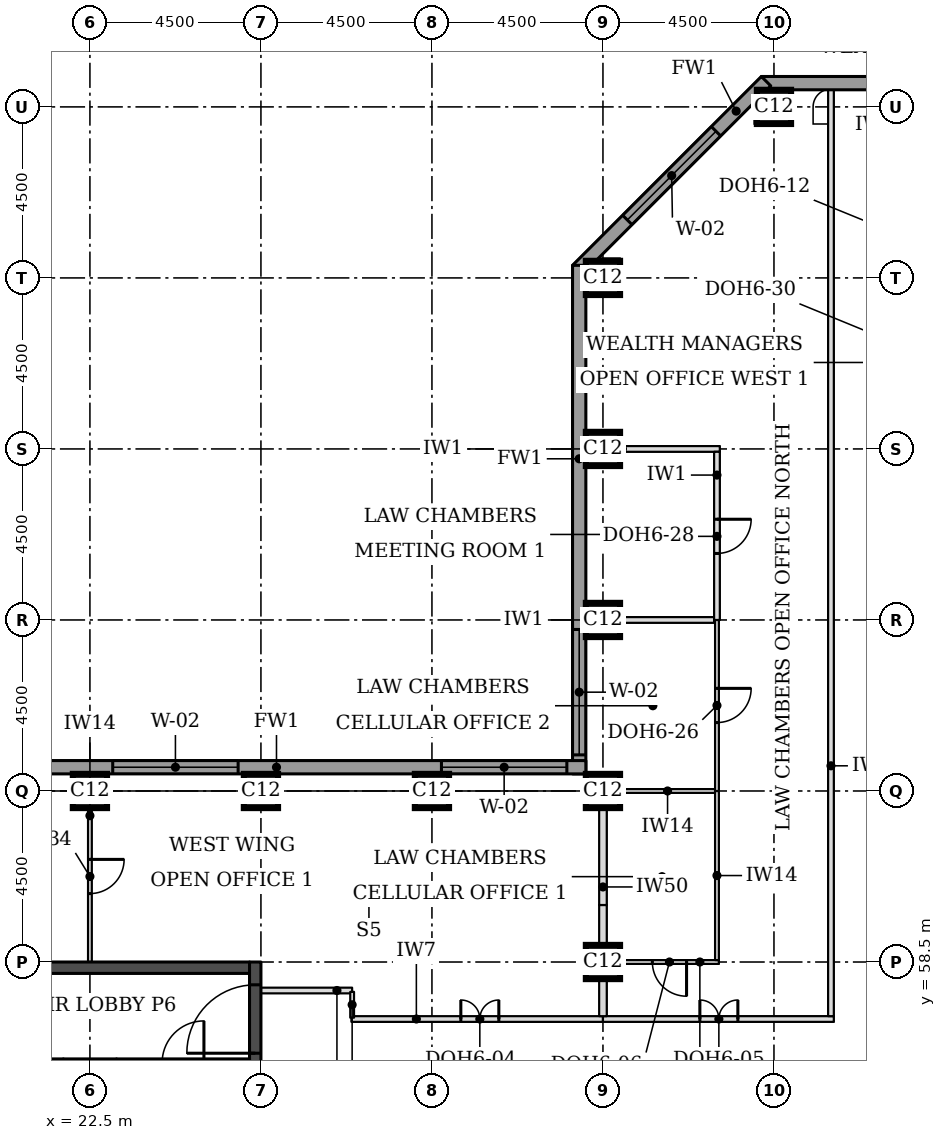
"""IFC4 building model, lengths in metres.
Left out: names, types, materials, properties, quantities, classifications, styles, units other than length and angle.
Written with IfcOpenShell. Run it as: python <this file> out.ifc"""

import sys

from ifc_helpers import new_model, si_unit, direction, frame, frame_2d, origin, origin_2d, place, context, subcontext, project, spatial, rectangle, extrude, element, fill, save


model = new_model("IFC4")
c1 = context("Model", 3, precision=1e-05, world=origin(), true_north=direction((0.0, 1.0)))
c2 = subcontext(c1, "Body", "Model", "MODEL_VIEW")
j1 = project(units=[si_unit("LENGTHUNIT", "METRE"), si_unit("PLANEANGLEUNIT", "RADIAN")], contexts=[c1])
p1 = place(None, origin())
s1 = spatial("IfcSite", under=j1, at=p1, CompositionType="ELEMENT")
p2 = place(p1, origin())
s2 = spatial("IfcBuilding", under=s1, at=p2, CompositionType="ELEMENT")
p3 = place(p2, frame((0.0, 0.0, 188.4)))
s3 = spatial("IfcBuildingStorey", under=s2, at=p3, CompositionType="ELEMENT", Elevation=188.4)
for number, where, z_axis, x_axis in (
    (1, (36.0, 58.5, 0.0), (0.0, 0.0, 1.0), (1.0, 0.0, 0.0)),
    (2, (22.5, 63.0, 0.0), (0.0, 0.0, 1.0), (1.0, 0.0, 0.0)),
    (3, (27.0, 63.0, 0.0), (0.0, 0.0, 1.0), (1.0, 0.0, 0.0)),
    (4, (31.5, 63.0, 0.0), (0.0, 0.0, 1.0), (1.0, 0.0, 0.0)),
    (5, (36.0, 63.0, 0.0), (0.0, 0.0, 1.0), (1.0, 0.0, 0.0)),
    (6, (36.0, 67.5, 0.0), (0.0, 0.0, 1.0), (1.0, 0.0, 0.0)),
    (7, (36.0, 72.0, 0.0), (0.0, 0.0, 1.0), (1.0, 0.0, 0.0)),
    (8, (36.0, 76.5, 0.0), (0.0, 0.0, 1.0), (1.0, 0.0, 0.0)),
    (9, (40.5, 81.0, 0.0), (0.0, 0.0, 1.0), (1.0, 0.0, 0.0)),
):
    element("IfcColumn", number, at=place(p3, frame(where, z_axis=z_axis, x_axis=x_axis)), inside=s3, PredefinedType="COLUMN", context=c2, shape_type="SweptSolid", body=[
        extrude(rectangle(XDim=0.9, YDim=0.9, at=origin_2d()), origin(), (0.0, 0.0, 1.0), 3.7),
    ])
p4 = place(p3, frame((18.3, 58.35, 0.0), z_axis=(0.0, 0.0, 1.0), x_axis=(1.0, 0.0, 0.0)))
e10 = element("IfcWall", 10, at=p4, inside=s3, PredefinedType="SHEAR", context=c2, shape_type="SweptSolid", body=[
    extrude(rectangle(XDim=8.4, YDim=0.3, at=frame_2d((4.2, 0.0))), origin(), (0.0, 0.0, 1.0), 3.7),
])
p5 = place(p3, frame((26.85, 49.5, 0.0), z_axis=(0.0, 0.0, 1.0), x_axis=(0.0, 1.0, 0.0)))
e11 = element("IfcWall", 11, at=p5, inside=s3, PredefinedType="SHEAR", context=c2, shape_type="SweptSolid", body=[
    extrude(rectangle(XDim=9.0, YDim=0.3, at=frame_2d((4.5, 0.0))), origin(), (0.0, 0.0, 1.0), 3.7),
])
p6 = place(p5, frame((6.6, 0.0, 0.0)))
e12 = element("IfcOpeningElement", 12, at=p6, cuts=e11, PredefinedType="OPENING", context=c2, shape_type="SweptSolid", body=[
    extrude(rectangle(XDim=1.8, YDim=2.1, at=frame_2d((0.9, 1.05))), frame((0.0, 0.16, 0.0), z_axis=(0.0, -1.0, 0.0), x_axis=(1.0, 0.0, 0.0)), (0.0, 0.0, 1.0), 0.32),
])
p7 = place(p3, frame((72.331, 81.625, 0.0), z_axis=(0.0, 0.0, 1.0), x_axis=(-1.0, 0.0, 0.0)))
e13 = element("IfcWall", 13, at=p7, inside=s3, PredefinedType="STANDARD", context=c2, shape_type="SweptSolid", body=[
    extrude(rectangle(XDim=32.163, YDim=0.35, at=frame_2d((16.081, 0.0))), origin(), (0.0, 0.0, 1.0), 3.525),
])
p8 = place(p7, frame((5.431, 0.0, 0.9)))
e14 = element("IfcOpeningElement", 14, at=p8, cuts=e13, PredefinedType="OPENING", context=c2, shape_type="SweptSolid", body=[
    extrude(rectangle(XDim=3.3, YDim=1.9, at=frame_2d((1.65, 0.95))), frame((0.0, 0.185, 0.0), z_axis=(0.0, -1.0, 0.0), x_axis=(1.0, 0.0, 0.0)), (0.0, 0.0, 1.0), 0.37),
])
p9 = place(p7, frame((9.931, 0.0, 0.9)))
e15 = element("IfcOpeningElement", 15, at=p9, cuts=e13, PredefinedType="OPENING", context=c2, shape_type="SweptSolid", body=[
    extrude(rectangle(XDim=3.3, YDim=1.9, at=frame_2d((1.65, 0.95))), frame((0.0, 0.185, 0.0), z_axis=(0.0, -1.0, 0.0), x_axis=(1.0, 0.0, 0.0)), (0.0, 0.0, 1.0), 0.37),
])
p10 = place(p7, frame((14.431, 0.0, 0.9)))
e16 = element("IfcOpeningElement", 16, at=p10, cuts=e13, PredefinedType="OPENING", context=c2, shape_type="SweptSolid", body=[
    extrude(rectangle(XDim=3.3, YDim=1.9, at=frame_2d((1.65, 0.95))), frame((0.0, 0.185, 0.0), z_axis=(0.0, -1.0, 0.0), x_axis=(1.0, 0.0, 0.0)), (0.0, 0.0, 1.0), 0.37),
])
p11 = place(p7, frame((18.931, 0.0, 0.9)))
e17 = element("IfcOpeningElement", 17, at=p11, cuts=e13, PredefinedType="OPENING", context=c2, shape_type="SweptSolid", body=[
    extrude(rectangle(XDim=3.3, YDim=1.9, at=frame_2d((1.65, 0.95))), frame((0.0, 0.185, 0.0), z_axis=(0.0, -1.0, 0.0), x_axis=(1.0, 0.0, 0.0)), (0.0, 0.0, 1.0), 0.37),
])
p12 = place(p7, frame((23.431, 0.0, 0.9)))
e18 = element("IfcOpeningElement", 18, at=p12, cuts=e13, PredefinedType="OPENING", context=c2, shape_type="SweptSolid", body=[
    extrude(rectangle(XDim=3.3, YDim=1.9, at=frame_2d((1.65, 0.95))), frame((0.0, 0.185, 0.0), z_axis=(0.0, -1.0, 0.0), x_axis=(1.0, 0.0, 0.0)), (0.0, 0.0, 1.0), 0.37),
])
p13 = place(p3, frame((40.292, 81.676, 0.0), z_axis=(0.0, 0.0, 1.0), x_axis=(-0.707106781187, -0.707106781187, 0.0)))
e19 = element("IfcWall", 19, at=p13, inside=s3, PredefinedType="STANDARD", context=c2, shape_type="SweptSolid", body=[
    extrude(rectangle(XDim=7.027, YDim=0.35, at=frame_2d((3.513, 0.0))), origin(), (0.0, 0.0, 1.0), 3.525),
])
p14 = place(p13, frame((1.863, 0.0, 0.9)))
e20 = element("IfcOpeningElement", 20, at=p14, cuts=e19, PredefinedType="OPENING", context=c2, shape_type="SweptSolid", body=[
    extrude(rectangle(XDim=3.3, YDim=1.9, at=frame_2d((1.65, 0.95))), frame((0.0, 0.185, 0.0), z_axis=(0.0, -1.0, 0.0), x_axis=(1.0, 0.0, 0.0)), (0.0, 0.0, 1.0), 0.37),
])
p15 = place(p3, frame((35.375, 76.831, 0.0), z_axis=(0.0, 0.0, 1.0), x_axis=(0.0, -1.0, 0.0)))
e21 = element("IfcWall", 21, at=p15, inside=s3, PredefinedType="STANDARD", context=c2, shape_type="SweptSolid", body=[
    extrude(rectangle(XDim=13.381, YDim=0.35, at=frame_2d((6.691, 0.0))), origin(), (0.0, 0.0, 1.0), 3.525),
])
p16 = place(p15, frame((9.581, 0.0, 0.9)))
e22 = element("IfcOpeningElement", 22, at=p16, cuts=e21, PredefinedType="OPENING", context=c2, shape_type="SweptSolid", body=[
    extrude(rectangle(XDim=3.3, YDim=1.9, at=frame_2d((1.65, 0.95))), frame((0.0, 0.185, 0.0), z_axis=(0.0, -1.0, 0.0), x_axis=(1.0, 0.0, 0.0)), (0.0, 0.0, 1.0), 0.37),
])
p17 = place(p3, frame((35.55, 63.625, 0.0), z_axis=(0.0, 0.0, 1.0), x_axis=(-1.0, 0.0, 0.0)))
e23 = element("IfcWall", 23, at=p17, inside=s3, PredefinedType="STANDARD", context=c2, shape_type="SweptSolid", body=[
    extrude(rectangle(XDim=17.881, YDim=0.35, at=frame_2d((8.941, 0.0))), origin(), (0.0, 0.0, 1.0), 3.525),
])
p18 = place(p17, frame((0.5, 0.0, 0.9)))
e24 = element("IfcOpeningElement", 24, at=p18, cuts=e23, PredefinedType="OPENING", context=c2, shape_type="SweptSolid", body=[
    extrude(rectangle(XDim=3.3, YDim=1.9, at=frame_2d((1.65, 0.95))), frame((0.0, 0.185, 0.0), z_axis=(0.0, -1.0, 0.0), x_axis=(1.0, 0.0, 0.0)), (0.0, 0.0, 1.0), 0.37),
])
p19 = place(p17, frame((9.15, 0.0, 0.9)))
e25 = element("IfcOpeningElement", 25, at=p19, cuts=e23, PredefinedType="OPENING", context=c2, shape_type="SweptSolid", body=[
    extrude(rectangle(XDim=3.3, YDim=1.9, at=frame_2d((1.65, 0.95))), frame((0.0, 0.185, 0.0), z_axis=(0.0, -1.0, 0.0), x_axis=(1.0, 0.0, 0.0)), (0.0, 0.0, 1.0), 0.37),
])
p20 = place(p3, frame((29.38, 57.0, 0.0), z_axis=(0.0, 0.0, 1.0), x_axis=(1.0, 0.0, 0.0)))
e26 = element("IfcWall", 26, at=p20, inside=s3, PredefinedType="PARTITIONING", context=c2, shape_type="SweptSolid", body=[
    extrude(rectangle(XDim=6.62, YDim=0.15, at=frame_2d((3.31, 0.0))), origin(), (0.0, 0.0, 1.0), 3.55),
])
p21 = place(p20, frame((2.88, 0.0, 0.0)))
e27 = element("IfcOpeningElement", 27, at=p21, cuts=e26, PredefinedType="OPENING", context=c2, shape_type="SweptSolid", body=[
    extrude(rectangle(XDim=1.0, YDim=2.1, at=frame_2d((0.5, 1.05))), frame((0.0, 0.085, 0.0), z_axis=(0.0, -1.0, 0.0), x_axis=(1.0, 0.0, 0.0)), (0.0, 0.0, 1.0), 0.17),
])
p22 = place(p3, frame((36.0, 57.0, 0.0), z_axis=(0.0, 0.0, 1.0), x_axis=(1.0, 0.0, 0.0)))
e28 = element("IfcWall", 28, at=p22, inside=s3, PredefinedType="PARTITIONING", context=c2, shape_type="SweptSolid", body=[
    extrude(rectangle(XDim=6.075, YDim=0.15, at=frame_2d((3.038, 0.0))), origin(), (0.0, 0.0, 1.0), 3.55),
])
p23 = place(p22, frame((2.55, 0.0, 0.0)))
e29 = element("IfcOpeningElement", 29, at=p23, cuts=e28, PredefinedType="OPENING", context=c2, shape_type="SweptSolid", body=[
    extrude(rectangle(XDim=1.0, YDim=2.1, at=frame_2d((0.5, 1.05))), frame((0.0, 0.085, 0.0), z_axis=(0.0, -1.0, 0.0), x_axis=(1.0, 0.0, 0.0)), (0.0, 0.0, 1.0), 0.17),
])
p24 = place(p3, frame((36.45, 58.5, 0.0), z_axis=(0.0, 0.0, 1.0), x_axis=(1.0, 0.0, 0.0)))
e30 = element("IfcWall", 30, at=p24, inside=s3, PredefinedType="PARTITIONING", context=c2, shape_type="SweptSolid", body=[
    extrude(rectangle(XDim=2.6, YDim=0.1, at=frame_2d((1.3, 0.0))), origin(), (0.0, 0.0, 1.0), 3.55),
])
p25 = place(p24, frame((0.85, 0.0, 0.0)))
e31 = element("IfcOpeningElement", 31, at=p25, cuts=e30, PredefinedType="OPENING", context=c2, shape_type="SweptSolid", body=[
    extrude(rectangle(XDim=0.9, YDim=2.1, at=frame_2d((0.45, 1.05))), frame((0.0, 0.06, 0.0), z_axis=(0.0, -1.0, 0.0), x_axis=(1.0, 0.0, 0.0)), (0.0, 0.0, 1.0), 0.12),
])
p26 = place(p3, frame((36.45, 63.0, 0.0), z_axis=(0.0, 0.0, 1.0), x_axis=(1.0, 0.0, 0.0)))
e32 = element("IfcWall", 32, at=p26, inside=s3, PredefinedType="PARTITIONING", context=c2, shape_type="SweptSolid", body=[
    extrude(rectangle(XDim=2.5, YDim=0.1, at=frame_2d((1.25, 0.0))), origin(), (0.0, 0.0, 1.0), 3.55),
])
p27 = place(p3, frame((35.55, 67.5, 0.0), z_axis=(0.0, 0.0, 1.0), x_axis=(1.0, 0.0, 0.0)))
e33 = element("IfcWall", 33, at=p27, inside=s3, PredefinedType="PARTITIONING", context=c2, shape_type="SweptSolid", body=[
    extrude(rectangle(XDim=3.375, YDim=0.15, at=frame_2d((1.688, 0.0))), origin(), (0.0, 0.0, 1.0), 3.55),
])
p28 = place(p3, frame((35.55, 72.0, 0.0), z_axis=(0.0, 0.0, 1.0), x_axis=(1.0, 0.0, 0.0)))
e34 = element("IfcWall", 34, at=p28, inside=s3, PredefinedType="PARTITIONING", context=c2, shape_type="SweptSolid", body=[
    extrude(rectangle(XDim=3.525, YDim=0.15, at=frame_2d((1.762, 0.0))), origin(), (0.0, 0.0, 1.0), 3.55),
])
p29 = place(p3, frame((36.0, 57.075, 0.0), z_axis=(0.0, 0.0, 1.0), x_axis=(0.0, 1.0, 0.0)))
e35 = element("IfcWall", 35, at=p29, inside=s3, PredefinedType="PARTITIONING", context=c2, shape_type="SweptSolid", body=[
    extrude(rectangle(XDim=0.975, YDim=0.2, at=frame_2d((0.488, 0.0))), origin(), (0.0, 0.0, 1.0), 2.8),
])
p30 = place(p3, frame((42.0, 57.075, 0.0), z_axis=(0.0, 0.0, 1.0), x_axis=(0.0, 1.0, 0.0)))
e36 = element("IfcWall", 36, at=p30, inside=s3, PredefinedType="PARTITIONING", context=c2, shape_type="SweptSolid", body=[
    extrude(rectangle(XDim=24.375, YDim=0.15, at=frame_2d((12.188, 0.0))), origin(), (0.0, 0.0, 1.0), 3.55),
])
p31 = place(p3, frame((39.0, 58.55, 0.0), z_axis=(0.0, 0.0, 1.0), x_axis=(0.0, 1.0, 0.0)))
e37 = element("IfcWall", 37, at=p31, inside=s3, PredefinedType="PARTITIONING", context=c2, shape_type="SweptSolid", body=[
    extrude(rectangle(XDim=4.45, YDim=0.1, at=frame_2d((2.225, 0.0))), origin(), (0.0, 0.0, 1.0), 3.55),
])
p32 = place(p3, frame((36.0, 58.92, 0.0), z_axis=(0.0, 0.0, 1.0), x_axis=(0.0, 1.0, 0.0)))
e38 = element("IfcWall", 38, at=p32, inside=s3, PredefinedType="PARTITIONING", context=c2, shape_type="SweptSolid", body=[
    extrude(rectangle(XDim=1.08, YDim=0.2, at=frame_2d((0.54, 0.0))), origin(), (0.0, 0.0, 1.0), 2.8),
])
p33 = place(p3, frame((36.0, 60.0, 0.0), z_axis=(0.0, 0.0, 1.0), x_axis=(0.0, 1.0, 0.0)))
e39 = element("IfcWall", 39, at=p33, inside=s3, PredefinedType="PARTITIONING", context=c2, shape_type="SweptSolid", body=[
    extrude(rectangle(XDim=2.55, YDim=0.2, at=frame_2d((1.275, 0.0))), origin(), (0.0, 0.0, 1.0), 2.8),
])
p34 = place(p3, frame((39.0, 63.0, 0.0), z_axis=(0.0, 0.0, 1.0), x_axis=(0.0, 1.0, 0.0)))
e40 = element("IfcWall", 40, at=p34, inside=s3, PredefinedType="PARTITIONING", context=c2, shape_type="SweptSolid", body=[
    extrude(rectangle(XDim=4.5, YDim=0.1, at=frame_2d((2.25, 0.0))), origin(), (0.0, 0.0, 1.0), 3.55),
])
p35 = place(p34, frame((1.8, 0.0, 0.0)))
e41 = element("IfcOpeningElement", 41, at=p35, cuts=e40, PredefinedType="OPENING", context=c2, shape_type="SweptSolid", body=[
    extrude(rectangle(XDim=0.9, YDim=2.1, at=frame_2d((0.45, 1.05))), frame((0.0, 0.06, 0.0), z_axis=(0.0, -1.0, 0.0), x_axis=(1.0, 0.0, 0.0)), (0.0, 0.0, 1.0), 0.12),
])
p36 = place(p3, frame((39.0, 67.5, 0.0), z_axis=(0.0, 0.0, 1.0), x_axis=(0.0, 1.0, 0.0)))
e42 = element("IfcWall", 42, at=p36, inside=s3, PredefinedType="PARTITIONING", context=c2, shape_type="SweptSolid", body=[
    extrude(rectangle(XDim=4.425, YDim=0.15, at=frame_2d((2.212, 0.0))), origin(), (0.0, 0.0, 1.0), 3.55),
])
p37 = place(p36, frame((1.75, 0.0, 0.0)))
e43 = element("IfcOpeningElement", 43, at=p37, cuts=e42, PredefinedType="OPENING", context=c2, shape_type="SweptSolid", body=[
    extrude(rectangle(XDim=0.9, YDim=2.1, at=frame_2d((0.45, 1.05))), frame((0.0, 0.085, 0.0), z_axis=(0.0, -1.0, 0.0), x_axis=(1.0, 0.0, 0.0)), (0.0, 0.0, 1.0), 0.17),
])
p38 = place(p3, frame((22.5, 63.0, 0.0), z_axis=(0.0, 0.0, 1.0), x_axis=(0.0, -1.0, 0.0)))
e44 = element("IfcWall", 44, at=p38, inside=s3, PredefinedType="PARTITIONING", context=c2, shape_type="SweptSolid", body=[
    extrude(rectangle(XDim=4.5, YDim=0.1, at=frame_2d((2.25, 0.0))), origin(), (0.0, 0.0, 1.0), 3.55),
])
p39 = place(p38, frame((1.8, 0.0, 0.0)))
e45 = element("IfcOpeningElement", 45, at=p39, cuts=e44, PredefinedType="OPENING", context=c2, shape_type="SweptSolid", body=[
    extrude(rectangle(XDim=0.9, YDim=2.1, at=frame_2d((0.45, 1.05))), frame((0.0, 0.06, 0.0), z_axis=(0.0, -1.0, 0.0), x_axis=(1.0, 0.0, 0.0)), (0.0, 0.0, 1.0), 0.12),
])
p40 = place(p3, frame((27.0, 57.75, 0.0), z_axis=(0.0, 0.0, 1.0), x_axis=(1.0, 0.0, 0.0)))
e46 = element("IfcWall", 46, at=p40, inside=s3, PredefinedType="PARTITIONING", context=c2, shape_type="SweptSolid", body=[
    extrude(rectangle(XDim=2.4, YDim=0.15, at=frame_2d((1.2, 0.0))), origin(), (0.0, 0.0, 1.0), 3.55),
])
p41 = place(p3, frame((29.4, 57.715, 0.0), z_axis=(0.0, 0.0, 1.0), x_axis=(0.0, -1.0, 0.0)))
e47 = element("IfcWall", 47, at=p41, inside=s3, PredefinedType="PARTITIONING", context=c2, shape_type="SweptSolid", body=[
    extrude(rectangle(XDim=0.68, YDim=0.1, at=frame_2d((0.34, 0.0))), origin(), (0.0, 0.0, 1.0), 3.55),
])
p42 = place(p3, frame((21.8, 55.85, 0.0), z_axis=(0.0, 0.0, 1.0), x_axis=(1.0, 0.0, 0.0)))
e48 = element("IfcWall", 48, at=p42, inside=s3, PredefinedType="SOLIDWALL", context=c2, shape_type="SweptSolid", body=[
    extrude(rectangle(XDim=1.4, YDim=0.2, at=frame_2d((0.7, 0.0))), origin(), (0.0, 0.0, 1.0), 3.55),
])
p43 = place(p3, frame((18.3, 55.85, 0.0), z_axis=(0.0, 0.0, 1.0), x_axis=(1.0, 0.0, 0.0)))
e49 = element("IfcWall", 49, at=p43, inside=s3, PredefinedType="SOLIDWALL", context=c2, shape_type="SweptSolid", body=[
    extrude(rectangle(XDim=3.5, YDim=0.2, at=frame_2d((1.75, 0.0))), origin(), (0.0, 0.0, 1.0), 3.55),
])
p44 = place(p43, frame((1.2, 0.0, 0.0)))
e50 = element("IfcOpeningElement", 50, at=p44, cuts=e49, PredefinedType="OPENING", context=c2, shape_type="SweptSolid", body=[
    extrude(rectangle(XDim=1.1, YDim=2.1, at=frame_2d((0.55, 1.05))), frame((0.0, 0.11, 0.0), z_axis=(0.0, -1.0, 0.0), x_axis=(1.0, 0.0, 0.0)), (0.0, 0.0, 1.0), 0.22),
])
p45 = place(p3, frame((23.2, 55.85, 0.0), z_axis=(0.0, 0.0, 1.0), x_axis=(1.0, 0.0, 0.0)))
e51 = element("IfcWall", 51, at=p45, inside=s3, PredefinedType="SOLIDWALL", context=c2, shape_type="SweptSolid", body=[
    extrude(rectangle(XDim=3.5, YDim=0.2, at=frame_2d((1.75, 0.0))), origin(), (0.0, 0.0, 1.0), 3.55),
])
p46 = place(p45, frame((1.2, 0.0, 0.0)))
e52 = element("IfcOpeningElement", 52, at=p46, cuts=e51, PredefinedType="OPENING", context=c2, shape_type="SweptSolid", body=[
    extrude(rectangle(XDim=1.1, YDim=2.1, at=frame_2d((0.55, 1.05))), frame((0.0, 0.11, 0.0), z_axis=(0.0, -1.0, 0.0), x_axis=(1.0, 0.0, 0.0)), (0.0, 0.0, 1.0), 0.22),
])
p47 = place(p14, origin())
e53 = element("IfcWindow", 53, at=p47, inside=s3, PartitioningType="SINGLE_PANEL", PredefinedType="WINDOW", context=c2, shape_type="SweptSolid", body=[
    extrude(rectangle(XDim=3.3, YDim=1.9, at=frame_2d((1.65, 0.95))), frame((0.0, 0.085, 0.0), z_axis=(0.0, -1.0, 0.0), x_axis=(1.0, 0.0, 0.0)), (0.0, 0.0, 1.0), 0.06),
])
fill(e20, e53)
p48 = place(p16, origin())
e54 = element("IfcWindow", 54, at=p48, inside=s3, PartitioningType="SINGLE_PANEL", PredefinedType="WINDOW", context=c2, shape_type="SweptSolid", body=[
    extrude(rectangle(XDim=3.3, YDim=1.9, at=frame_2d((1.65, 0.95))), frame((0.0, 0.085, 0.0), z_axis=(0.0, -1.0, 0.0), x_axis=(1.0, 0.0, 0.0)), (0.0, 0.0, 1.0), 0.06),
])
fill(e22, e54)
p49 = place(p18, origin())
e55 = element("IfcWindow", 55, at=p49, inside=s3, PartitioningType="SINGLE_PANEL", PredefinedType="WINDOW", context=c2, shape_type="SweptSolid", body=[
    extrude(rectangle(XDim=3.3, YDim=1.9, at=frame_2d((1.65, 0.95))), frame((0.0, 0.085, 0.0), z_axis=(0.0, -1.0, 0.0), x_axis=(1.0, 0.0, 0.0)), (0.0, 0.0, 1.0), 0.06),
])
fill(e24, e55)
p50 = place(p19, origin())
e56 = element("IfcWindow", 56, at=p50, inside=s3, PartitioningType="SINGLE_PANEL", PredefinedType="WINDOW", context=c2, shape_type="SweptSolid", body=[
    extrude(rectangle(XDim=3.3, YDim=1.9, at=frame_2d((1.65, 0.95))), frame((0.0, 0.085, 0.0), z_axis=(0.0, -1.0, 0.0), x_axis=(1.0, 0.0, 0.0)), (0.0, 0.0, 1.0), 0.06),
])
fill(e25, e56)
p51 = place(p23, origin())
e57 = element("IfcDoor", 57, at=p51, inside=s3, OperationType="DOUBLE_DOOR_SINGLE_SWING", PredefinedType="DOOR", context=c2, shape_type="SweptSolid", body=[
    extrude(rectangle(XDim=1.0, YDim=2.1, at=frame_2d((0.5, 1.05))), frame((0.0, 0.025, 0.0), z_axis=(0.0, -1.0, 0.0), x_axis=(1.0, 0.0, 0.0)), (0.0, 0.0, 1.0), 0.05),
])
fill(e29, e57)
p52 = place(p25, frame((0.9, 0.0, 0.0), z_axis=(0.0, 0.0, 1.0), x_axis=(-1.0, 0.0, 0.0)))
e58 = element("IfcDoor", 58, at=p52, inside=s3, OperationType="SINGLE_SWING_LEFT", PredefinedType="DOOR", context=c2, shape_type="SweptSolid", body=[
    extrude(rectangle(XDim=0.9, YDim=2.1, at=frame_2d((0.45, 1.05))), frame((0.0, 0.025, 0.0), z_axis=(0.0, -1.0, 0.0), x_axis=(1.0, 0.0, 0.0)), (0.0, 0.0, 1.0), 0.05),
])
fill(e31, e58)
p53 = place(p35, frame((0.9, 0.0, 0.0), z_axis=(0.0, 0.0, 1.0), x_axis=(-1.0, 0.0, 0.0)))
e59 = element("IfcDoor", 59, at=p53, inside=s3, OperationType="SINGLE_SWING_LEFT", PredefinedType="DOOR", context=c2, shape_type="SweptSolid", body=[
    extrude(rectangle(XDim=0.9, YDim=2.1, at=frame_2d((0.45, 1.05))), frame((0.0, 0.025, 0.0), z_axis=(0.0, -1.0, 0.0), x_axis=(1.0, 0.0, 0.0)), (0.0, 0.0, 1.0), 0.05),
])
fill(e41, e59)
p54 = place(p37, frame((0.9, 0.0, 0.0), z_axis=(0.0, 0.0, 1.0), x_axis=(-1.0, 0.0, 0.0)))
e60 = element("IfcDoor", 60, at=p54, inside=s3, OperationType="SINGLE_SWING_LEFT", PredefinedType="DOOR", context=c2, shape_type="SweptSolid", body=[
    extrude(rectangle(XDim=0.9, YDim=2.1, at=frame_2d((0.45, 1.05))), frame((0.0, 0.025, 0.0), z_axis=(0.0, -1.0, 0.0), x_axis=(1.0, 0.0, 0.0)), (0.0, 0.0, 1.0), 0.05),
])
fill(e43, e60)
p55 = place(p21, origin())
e61 = element("IfcDoor", 61, at=p55, inside=s3, OperationType="DOUBLE_DOOR_SINGLE_SWING", PredefinedType="DOOR", context=c2, shape_type="SweptSolid", body=[
    extrude(rectangle(XDim=1.0, YDim=2.1, at=frame_2d((0.5, 1.05))), frame((0.0, 0.025, 0.0), z_axis=(0.0, -1.0, 0.0), x_axis=(1.0, 0.0, 0.0)), (0.0, 0.0, 1.0), 0.05),
])
fill(e27, e61)
p56 = place(p39, origin())
e62 = element("IfcDoor", 62, at=p56, inside=s3, OperationType="SINGLE_SWING_LEFT", PredefinedType="DOOR", context=c2, shape_type="SweptSolid", body=[
    extrude(rectangle(XDim=0.9, YDim=2.1, at=frame_2d((0.45, 1.05))), frame((0.0, 0.025, 0.0), z_axis=(0.0, -1.0, 0.0), x_axis=(1.0, 0.0, 0.0)), (0.0, 0.0, 1.0), 0.05),
])
fill(e45, e62)
p57 = place(p6, origin())
e63 = element("IfcDoor", 63, at=p57, inside=s3, OperationType="SINGLE_SWING_LEFT", PredefinedType="DOOR", context=c2, shape_type="SweptSolid", body=[
    extrude(rectangle(XDim=1.8, YDim=2.1, at=frame_2d((0.9, 1.05))), frame((0.0, 0.025, 0.0), z_axis=(0.0, -1.0, 0.0), x_axis=(1.0, 0.0, 0.0)), (0.0, 0.0, 1.0), 0.05),
])
fill(e12, e63)
save(model, sys.argv[1])
